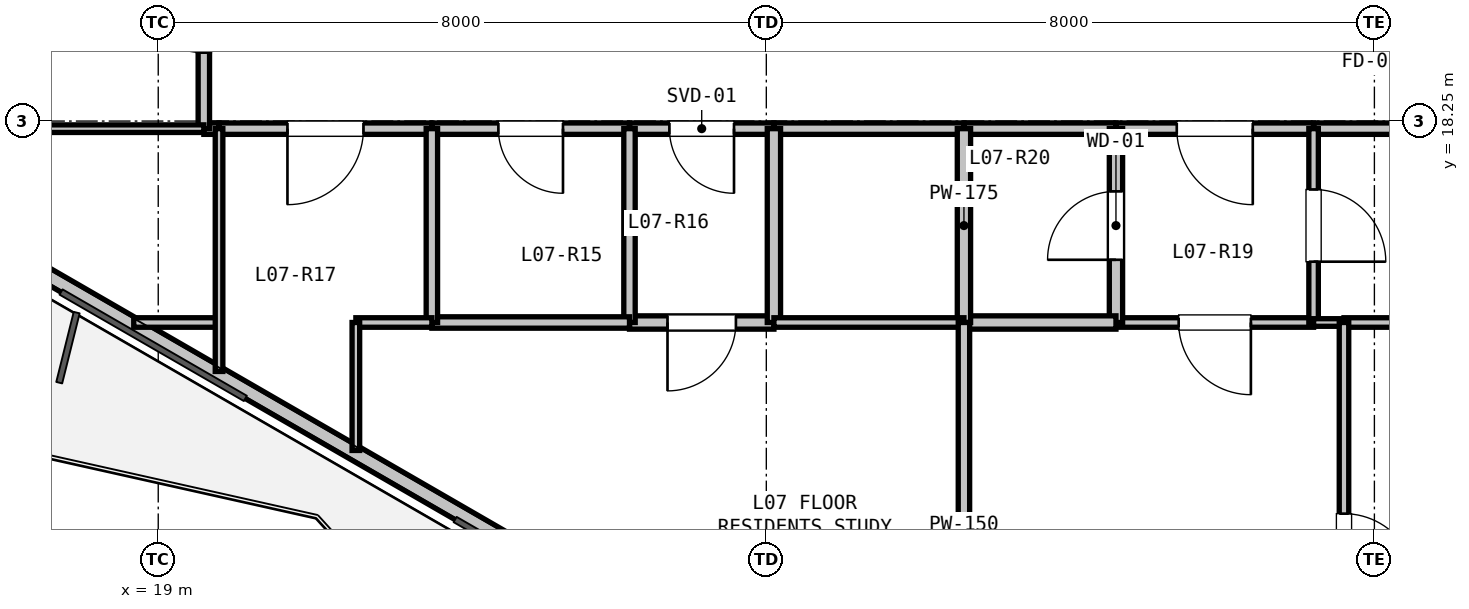
"""IFC4 building model, lengths in metres.
Left out: names, types, materials, properties, quantities, classifications, styles, units other than length and angle.
Written with IfcOpenShell. Run it as: python <this file> out.ifc"""

import sys

from ifc_helpers import new_model, si_unit, direction, frame, frame_2d, origin, place, context, subcontext, project, spatial, rectangle, extrude, element, fill, save


model = new_model("IFC4")
c1 = context("Model", 3, precision=1e-05, world=origin(), true_north=direction((0.0, 1.0)))
c2 = subcontext(c1, "Body", "Model", "MODEL_VIEW")
j1 = project(units=[si_unit("LENGTHUNIT", "METRE"), si_unit("PLANEANGLEUNIT", "RADIAN")], contexts=[c1])
p1 = place(None, origin())
s1 = spatial("IfcSite", under=j1, at=p1, CompositionType="ELEMENT")
p2 = place(p1, origin())
s2 = spatial("IfcBuilding", under=s1, at=p2, CompositionType="ELEMENT")
p3 = place(p2, frame((0.0, 0.0, 29.1)))
s3 = spatial("IfcBuildingStorey", under=s2, at=p3, CompositionType="ELEMENT", Elevation=29.1)
p4 = place(p3, frame((26.76, 10.896, 0.0), z_axis=(0.0, 0.0, 1.0), x_axis=(-0.866027351828, 0.499996625875, 0.0)))
e1 = element("IfcWall", 1, at=p4, inside=s3, PredefinedType="PARAPET", context=c2, shape_type="SweptSolid", body=[
    extrude(rectangle(XDim=11.973, YDim=0.2, at=frame_2d((5.987, 0.0))), origin(), (0.0, 0.0, 1.0), 0.2),
])
p5 = place(p3, frame((35.8, 18.15, 0.0), z_axis=(0.0, 0.0, 1.0), x_axis=(-1.0, 0.0, 0.0)))
e2 = element("IfcWall", 2, at=p5, inside=s3, PredefinedType="PARTITIONING", context=c2, shape_type="SweptSolid", body=[
    extrude(rectangle(XDim=1.6, YDim=0.15, at=frame_2d((0.8, 0.0))), origin(), (0.0, 0.0, 1.0), 3.04),
])
p6 = place(p3, frame((34.2, 18.15, 0.0), z_axis=(0.0, 0.0, 1.0), x_axis=(-1.0, 0.0, 0.0)))
e3 = element("IfcWall", 3, at=p6, inside=s3, PredefinedType="PARTITIONING", context=c2, shape_type="SweptSolid", body=[
    extrude(rectangle(XDim=2.6, YDim=0.15, at=frame_2d((1.3, 0.0))), origin(), (0.0, 0.0, 1.0), 3.04),
])
p7 = place(p6, frame((0.8, 0.0, 0.0)))
e4 = element("IfcOpeningElement", 4, at=p7, cuts=e3, PredefinedType="OPENING", context=c2, shape_type="SweptSolid", body=[
    extrude(rectangle(XDim=1.0, YDim=2.15, at=frame_2d((0.5, 1.075))), frame((0.0, 0.085, 0.0), z_axis=(0.0, -1.0, 0.0), x_axis=(1.0, 0.0, 0.0)), (0.0, 0.0, 1.0), 0.17),
])
p8 = place(p3, frame((31.6, 18.15, 0.0), z_axis=(0.0, 0.0, 1.0), x_axis=(-1.0, 0.0, 0.0)))
e5 = element("IfcWall", 5, at=p8, inside=s3, PredefinedType="PARTITIONING", context=c2, shape_type="SweptSolid", body=[
    extrude(rectangle(XDim=2.0, YDim=0.15, at=frame_2d((1.0, 0.0))), origin(), (0.0, 0.0, 1.0), 3.04),
])
p9 = place(p3, frame((29.6, 18.15, 0.0), z_axis=(0.0, 0.0, 1.0), x_axis=(-1.0, 0.0, 0.0)))
e6 = element("IfcWall", 6, at=p9, inside=s3, PredefinedType="PARTITIONING", context=c2, shape_type="SweptSolid", body=[
    extrude(rectangle(XDim=2.5, YDim=0.15, at=frame_2d((1.25, 0.0))), origin(), (0.0, 0.0, 1.0), 3.04),
])
p10 = place(p3, frame((27.1, 18.15, 0.0), z_axis=(0.0, 0.0, 1.0), x_axis=(-1.0, 0.0, 0.0)))
e7 = element("IfcWall", 7, at=p10, inside=s3, PredefinedType="PARTITIONING", context=c2, shape_type="SweptSolid", body=[
    extrude(rectangle(XDim=1.9, YDim=0.15, at=frame_2d((0.95, 0.0))), origin(), (0.0, 0.0, 1.0), 3.04),
])
p11 = place(p10, frame((0.525, 0.0, 0.0)))
e8 = element("IfcOpeningElement", 8, at=p11, cuts=e7, PredefinedType="OPENING", context=c2, shape_type="SweptSolid", body=[
    extrude(rectangle(XDim=0.85, YDim=2.1, at=frame_2d((0.425, 1.05))), frame((0.0, 0.085, 0.0), z_axis=(0.0, -1.0, 0.0), x_axis=(1.0, 0.0, 0.0)), (0.0, 0.0, 1.0), 0.17),
])
p12 = place(p3, frame((25.2, 18.15, 0.0), z_axis=(0.0, 0.0, 1.0), x_axis=(-1.0, 0.0, 0.0)))
e9 = element("IfcWall", 9, at=p12, inside=s3, PredefinedType="PARTITIONING", context=c2, shape_type="SweptSolid", body=[
    extrude(rectangle(XDim=2.6, YDim=0.15, at=frame_2d((1.3, 0.0))), origin(), (0.0, 0.0, 1.0), 2.337),
])
p13 = place(p12, frame((0.875, 0.0, 0.0)))
e10 = element("IfcOpeningElement", 10, at=p13, cuts=e9, PredefinedType="OPENING", context=c2, shape_type="SweptSolid", body=[
    extrude(rectangle(XDim=0.85, YDim=2.1, at=frame_2d((0.425, 1.05))), frame((0.0, 0.085, 0.0), z_axis=(0.0, -1.0, 0.0), x_axis=(1.0, 0.0, 0.0)), (0.0, 0.0, 1.0), 0.17),
])
p14 = place(p3, frame((22.6, 18.15, 0.0), z_axis=(0.0, 0.0, 1.0), x_axis=(-1.0, 0.0, 0.0)))
e11 = element("IfcWall", 11, at=p14, inside=s3, PredefinedType="PARTITIONING", context=c2, shape_type="SweptSolid", body=[
    extrude(rectangle(XDim=2.8, YDim=0.15, at=frame_2d((1.4, 0.0))), origin(), (0.0, 0.0, 1.0), 3.04),
])
p15 = place(p14, frame((0.9, 0.0, 0.0)))
e12 = element("IfcOpeningElement", 12, at=p15, cuts=e11, PredefinedType="OPENING", context=c2, shape_type="SweptSolid", body=[
    extrude(rectangle(XDim=1.0, YDim=2.15, at=frame_2d((0.5, 1.075))), frame((0.0, 0.085, 0.0), z_axis=(0.0, -1.0, 0.0), x_axis=(1.0, 0.0, 0.0)), (0.0, 0.0, 1.0), 0.17),
])
p16 = place(p3, frame((19.8, 18.15, 0.0), z_axis=(0.0, 0.0, 1.0), x_axis=(-1.0, 0.0, 0.0)))
e13 = element("IfcWall", 13, at=p16, inside=s3, PredefinedType="PARTITIONING", context=c2, shape_type="SweptSolid", body=[
    extrude(rectangle(XDim=0.2, YDim=0.15, at=frame_2d((0.1, 0.0))), origin(), (0.0, 0.0, 1.0), 3.04),
])
p17 = place(p3, frame((19.6, 18.15, 0.0), z_axis=(0.0, 0.0, 1.0), x_axis=(0.0, 1.0, 0.0)))
e14 = element("IfcWall", 14, at=p17, inside=s3, PredefinedType="PARTITIONING", context=c2, shape_type="SweptSolid", body=[
    extrude(rectangle(XDim=3.0, YDim=0.15, at=frame_2d((1.5, 0.0))), origin(), (0.0, 0.0, 1.0), 2.337),
])
p18 = place(p17, frame((1.0, 0.0, 0.0)))
e15 = element("IfcOpeningElement", 15, at=p18, cuts=e14, PredefinedType="OPENING", context=c2, shape_type="SweptSolid", body=[
    extrude(rectangle(XDim=1.0, YDim=2.15, at=frame_2d((0.5, 1.075))), frame((0.0, 0.085, 0.0), z_axis=(0.0, -1.0, 0.0), x_axis=(1.0, 0.0, 0.0)), (0.0, 0.0, 1.0), 0.17),
])
p19 = place(p3, frame((34.2, 15.6, 0.0), z_axis=(0.0, 0.0, 1.0), x_axis=(-1.0, 0.0, 0.0)))
e16 = element("IfcWall", 16, at=p19, inside=s3, PredefinedType="PARTITIONING", context=c2, shape_type="SweptSolid", body=[
    extrude(rectangle(XDim=2.6, YDim=0.125, at=frame_2d((1.3, 0.0))), origin(), (0.0, 0.0, 1.0), 3.04),
])
p20 = place(p19, frame((0.825, 0.0, 0.0)))
e17 = element("IfcOpeningElement", 17, at=p20, cuts=e16, PredefinedType="OPENING", context=c2, shape_type="SweptSolid", body=[
    extrude(rectangle(XDim=0.95, YDim=2.1, at=frame_2d((0.475, 1.05))), frame((0.0, 0.073, 0.0), z_axis=(0.0, -1.0, 0.0), x_axis=(1.0, 0.0, 0.0)), (0.0, 0.0, 1.0), 0.145),
])
p21 = place(p3, frame((31.6, 15.6, 0.0), z_axis=(0.0, 0.0, 1.0), x_axis=(0.0, 1.0, 0.0)))
e18 = element("IfcWall", 18, at=p21, inside=s3, PredefinedType="PLUMBINGWALL", context=c2, shape_type="SweptSolid", body=[
    extrude(rectangle(XDim=2.55, YDim=0.175, at=frame_2d((1.275, 0.0))), origin(), (0.0, 0.0, 1.0), 3.04),
])
p22 = place(p21, frame((0.825, 0.0, 0.0)))
e19 = element("IfcOpeningElement", 19, at=p22, cuts=e18, PredefinedType="OPENING", context=c2, shape_type="SweptSolid", body=[
    extrude(rectangle(XDim=0.9, YDim=2.1, at=frame_2d((0.45, 1.05))), frame((0.0, 0.097, 0.0), z_axis=(0.0, -1.0, 0.0), x_axis=(1.0, 0.0, 0.0)), (0.0, 0.0, 1.0), 0.195),
])
p23 = place(p3, frame((34.2, 18.15, 0.0), z_axis=(0.0, 0.0, 1.0), x_axis=(0.0, -1.0, 0.0)))
e20 = element("IfcWall", 20, at=p23, inside=s3, PredefinedType="PARTITIONING", context=c2, shape_type="SweptSolid", body=[
    extrude(rectangle(XDim=2.55, YDim=0.125, at=frame_2d((1.275, 0.0))), origin(), (0.0, 0.0, 1.0), 3.04),
])
p24 = place(p23, frame((0.8, 0.0, 0.0)))
e21 = element("IfcOpeningElement", 21, at=p24, cuts=e20, PredefinedType="OPENING", context=c2, shape_type="SweptSolid", body=[
    extrude(rectangle(XDim=0.95, YDim=2.1, at=frame_2d((0.475, 1.05))), frame((0.0, 0.073, 0.0), z_axis=(0.0, -1.0, 0.0), x_axis=(1.0, 0.0, 0.0)), (0.0, 0.0, 1.0), 0.145),
])
p25 = place(p3, frame((27.1, 15.6, 0.0), z_axis=(0.0, 0.0, 1.0), x_axis=(-1.0, 0.0, 0.0)))
e22 = element("IfcWall", 22, at=p25, inside=s3, PredefinedType="PLUMBINGWALL", context=c2, shape_type="SweptSolid", body=[
    extrude(rectangle(XDim=1.9, YDim=0.175, at=frame_2d((0.95, 0.0))), origin(), (0.0, 0.0, 1.0), 2.337),
])
p26 = place(p25, frame((0.5, 0.0, 0.0)))
e23 = element("IfcOpeningElement", 23, at=p26, cuts=e22, PredefinedType="OPENING", context=c2, shape_type="SweptSolid", body=[
    extrude(rectangle(XDim=0.9, YDim=2.1, at=frame_2d((0.45, 1.05))), frame((0.0, 0.097, 0.0), z_axis=(0.0, -1.0, 0.0), x_axis=(1.0, 0.0, 0.0)), (0.0, 0.0, 1.0), 0.195),
])
p27 = place(p3, frame((25.2, 15.6, 0.0), z_axis=(0.0, 0.0, 1.0), x_axis=(0.0, 1.0, 0.0)))
e24 = element("IfcWall", 24, at=p27, inside=s3, PredefinedType="PARTITIONING", context=c2, shape_type="SweptSolid", body=[
    extrude(rectangle(XDim=2.55, YDim=0.15, at=frame_2d((1.275, 0.0))), origin(), (0.0, 0.0, 1.0), 2.337),
])
p28 = place(p3, frame((27.1, 18.15, 0.0), z_axis=(0.0, 0.0, 1.0), x_axis=(0.0, -1.0, 0.0)))
e25 = element("IfcWall", 25, at=p28, inside=s3, PredefinedType="PLUMBINGWALL", context=c2, shape_type="SweptSolid", body=[
    extrude(rectangle(XDim=2.55, YDim=0.175, at=frame_2d((1.275, 0.0))), origin(), (0.0, 0.0, 1.0), 3.04),
])
p29 = place(p3, frame((31.6, 15.6, 0.0), z_axis=(0.0, 0.0, 1.0), x_axis=(-1.0, 0.0, 0.0)))
e26 = element("IfcWall", 26, at=p29, inside=s3, PredefinedType="PLUMBINGWALL", context=c2, shape_type="SweptSolid", body=[
    extrude(rectangle(XDim=2.0, YDim=0.175, at=frame_2d((1.0, 0.0))), origin(), (0.0, 0.0, 1.0), 3.04),
])
p30 = place(p3, frame((29.6, 15.6, 0.0), z_axis=(0.0, 0.0, 1.0), x_axis=(0.0, 1.0, 0.0)))
e27 = element("IfcWall", 27, at=p30, inside=s3, PredefinedType="PLUMBINGWALL", context=c2, shape_type="SweptSolid", body=[
    extrude(rectangle(XDim=2.55, YDim=0.175, at=frame_2d((1.275, 0.0))), origin(), (0.0, 0.0, 1.0), 3.04),
])
p31 = place(p3, frame((43.688, 15.6, 0.0), z_axis=(0.0, 0.0, 1.0), x_axis=(-1.0, 0.0, 0.0)))
e28 = element("IfcWall", 28, at=p31, inside=s3, PredefinedType="PARTITIONING", context=c2, shape_type="SweptSolid", body=[
    extrude(rectangle(XDim=9.088, YDim=0.125, at=frame_2d((4.544, 0.0))), origin(), (0.0, 0.0, 1.0), 2.337),
])
p32 = place(p31, frame((4.069, 0.0, 0.0)))
e29 = element("IfcOpeningElement", 29, at=p32, cuts=e28, PredefinedType="OPENING", context=c2, shape_type="SweptSolid", body=[
    extrude(rectangle(XDim=0.95, YDim=2.1, at=frame_2d((0.475, 1.05))), frame((0.0, 0.073, 0.0), z_axis=(0.0, -1.0, 0.0), x_axis=(1.0, 0.0, 0.0)), (0.0, 0.0, 1.0), 0.145),
])
p33 = place(p3, frame((34.6, 15.6, 0.0), z_axis=(0.0, 0.0, 1.0), x_axis=(-1.0, 0.0, 0.0)))
e30 = element("IfcWall", 30, at=p33, inside=s3, PredefinedType="PARTITIONING", context=c2, shape_type="SweptSolid", body=[
    extrude(rectangle(XDim=0.4, YDim=0.1, at=frame_2d((0.2, 0.0))), origin(), (0.0, 0.0, 1.0), 3.04),
])
p34 = place(p3, frame((19.6, 18.15, 0.0), z_axis=(0.0, 0.0, 1.0), x_axis=(-1.0, 0.0, 0.0)))
e31 = element("IfcWall", 31, at=p34, inside=s3, PredefinedType="PARTITIONING", context=c2, shape_type="SweptSolid", body=[
    extrude(rectangle(XDim=2.45, YDim=0.1, at=frame_2d((1.225, 0.0))), origin(), (0.0, 0.0, 1.0), 3.04),
])
p35 = place(p3, frame((25.2, 15.6, 0.0), z_axis=(0.0, 0.0, 1.0), x_axis=(-1.0, 0.0, 0.0)))
e32 = element("IfcWall", 32, at=p35, inside=s3, PredefinedType="PARTITIONING", context=c2, shape_type="SweptSolid", body=[
    extrude(rectangle(XDim=2.6, YDim=0.15, at=frame_2d((1.3, 0.0))), origin(), (0.0, 0.0, 1.0), 3.04),
])
p36 = place(p3, frame((22.6, 15.6, 0.0), z_axis=(0.0, 0.0, 1.0), x_axis=(0.0, 1.0, 0.0)))
e33 = element("IfcWall", 33, at=p36, inside=s3, PredefinedType="PARTITIONING", context=c2, shape_type="SweptSolid", body=[
    extrude(rectangle(XDim=2.55, YDim=0.15, at=frame_2d((1.275, 0.0))), origin(), (0.0, 0.0, 1.0), 3.04),
])
p37 = place(p3, frame((22.6, 15.6, 0.0), z_axis=(0.0, 0.0, 1.0), x_axis=(-1.0, 0.0, 0.0)))
e34 = element("IfcWall", 34, at=p37, inside=s3, PredefinedType="PARTITIONING", context=c2, shape_type="SweptSolid", body=[
    extrude(rectangle(XDim=1.0, YDim=0.125, at=frame_2d((0.5, 0.0))), origin(), (0.0, 0.0, 1.0), 3.04),
])
p38 = place(p3, frame((21.6, 15.6, 0.0), z_axis=(0.0, 0.0, 1.0), x_axis=(0.0, -1.0, 0.0)))
e35 = element("IfcWall", 35, at=p38, inside=s3, PredefinedType="PARTITIONING", context=c2, shape_type="SweptSolid", body=[
    extrude(rectangle(XDim=1.684, YDim=0.1, at=frame_2d((0.842, 0.0))), origin(), (0.0, 0.0, 1.0), 2.365),
])
p39 = place(p3, frame((18.678, 15.6, 0.0), z_axis=(0.0, 0.0, 1.0), x_axis=(1.0, 0.0, 0.0)))
e36 = element("IfcWall", 36, at=p39, inside=s3, PredefinedType="PARTITIONING", context=c2, shape_type="SweptSolid", body=[
    extrude(rectangle(XDim=1.122, YDim=0.125, at=frame_2d((0.561, 0.0))), origin(), (0.0, 0.0, 1.0), 2.365),
])
p40 = place(p3, frame((19.8, 14.956, 0.0), z_axis=(0.0, 0.0, 1.0), x_axis=(0.0, 1.0, 0.0)))
e37 = element("IfcWall", 37, at=p40, inside=s3, PredefinedType="PARTITIONING", context=c2, shape_type="SweptSolid", body=[
    extrude(rectangle(XDim=3.194, YDim=0.1, at=frame_2d((1.597, 0.0))), origin(), (0.0, 0.0, 1.0), 2.365),
])
p41 = place(p3, frame((27.1, 15.6, 0.0), z_axis=(0.0, 0.0, 1.0), x_axis=(1.0, 0.0, 0.0)))
e38 = element("IfcWall", 38, at=p41, inside=s3, PredefinedType="PARTITIONING", context=c2, shape_type="SweptSolid", body=[
    extrude(rectangle(XDim=2.5, YDim=0.125, at=frame_2d((1.25, 0.0))), origin(), (0.0, 0.0, 1.0), 3.04),
])
p42 = place(p3, frame((29.6, 15.6, 0.0), z_axis=(0.0, 0.0, 1.0), x_axis=(0.0, -1.0, 0.0)))
e39 = element("IfcWall", 39, at=p42, inside=s3, PredefinedType="PARTITIONING", context=c2, shape_type="SweptSolid", body=[
    extrude(rectangle(XDim=6.157, YDim=0.15, at=frame_2d((3.079, 0.0))), origin(), (0.0, 0.0, 1.0), 2.337),
])
p43 = place(p3, frame((34.6, 15.6, 0.0), z_axis=(0.0, 0.0, 1.0), x_axis=(0.0, -1.0, 0.0)))
e40 = element("IfcWall", 40, at=p43, inside=s3, PredefinedType="PARTITIONING", context=c2, shape_type="SweptSolid", body=[
    extrude(rectangle(XDim=5.98, YDim=0.125, at=frame_2d((2.99, 0.0))), origin(), (0.0, 0.0, 1.0), 3.04),
])
p44 = place(p43, frame((2.515, 0.0, 0.0)))
e41 = element("IfcOpeningElement", 41, at=p44, cuts=e40, PredefinedType="OPENING", context=c2, shape_type="SweptSolid", body=[
    extrude(rectangle(XDim=0.95, YDim=2.1, at=frame_2d((0.475, 1.05))), frame((0.0, 0.073, 0.0), z_axis=(0.0, -1.0, 0.0), x_axis=(1.0, 0.0, 0.0)), (0.0, 0.0, 1.0), 0.145),
])
p45 = place(p7, origin())
e42 = element("IfcDoor", 42, at=p45, inside=s3, OperationType="SINGLE_SWING_LEFT", PredefinedType="DOOR", context=c2, shape_type="SweptSolid", body=[
    extrude(rectangle(XDim=1.0, YDim=2.15, at=frame_2d((0.5, 1.075))), frame((0.0, 0.025, 0.0), z_axis=(0.0, -1.0, 0.0), x_axis=(1.0, 0.0, 0.0)), (0.0, 0.0, 1.0), 0.05),
])
fill(e4, e42)
p46 = place(p11, origin())
e43 = element("IfcDoor", 43, at=p46, inside=s3, OperationType="SINGLE_SWING_LEFT", PredefinedType="DOOR", context=c2, shape_type="SweptSolid", body=[
    extrude(rectangle(XDim=0.85, YDim=2.1, at=frame_2d((0.425, 1.05))), frame((0.0, 0.025, 0.0), z_axis=(0.0, -1.0, 0.0), x_axis=(1.0, 0.0, 0.0)), (0.0, 0.0, 1.0), 0.05),
])
fill(e8, e43)
p47 = place(p13, origin())
e44 = element("IfcDoor", 44, at=p47, inside=s3, OperationType="SINGLE_SWING_LEFT", PredefinedType="DOOR", context=c2, shape_type="SweptSolid", body=[
    extrude(rectangle(XDim=0.85, YDim=2.1, at=frame_2d((0.425, 1.05))), frame((0.0, 0.025, 0.0), z_axis=(0.0, -1.0, 0.0), x_axis=(1.0, 0.0, 0.0)), (0.0, 0.0, 1.0), 0.05),
])
fill(e10, e44)
p48 = place(p15, origin())
e45 = element("IfcDoor", 45, at=p48, inside=s3, OperationType="SINGLE_SWING_RIGHT", PredefinedType="DOOR", context=c2, shape_type="SweptSolid", body=[
    extrude(rectangle(XDim=1.0, YDim=2.15, at=frame_2d((0.5, 1.075))), frame((0.0, 0.025, 0.0), z_axis=(0.0, -1.0, 0.0), x_axis=(1.0, 0.0, 0.0)), (0.0, 0.0, 1.0), 0.05),
])
fill(e12, e45)
p49 = place(p22, origin())
e46 = element("IfcDoor", 46, at=p49, inside=s3, OperationType="SINGLE_SWING_LEFT", PredefinedType="DOOR", context=c2, shape_type="SweptSolid", body=[
    extrude(rectangle(XDim=0.9, YDim=2.1, at=frame_2d((0.45, 1.05))), frame((0.0, 0.025, 0.0), z_axis=(0.0, -1.0, 0.0), x_axis=(1.0, 0.0, 0.0)), (0.0, 0.0, 1.0), 0.05),
])
fill(e19, e46)
p50 = place(p24, origin())
e47 = element("IfcDoor", 47, at=p50, inside=s3, OperationType="SINGLE_SWING_RIGHT", PredefinedType="DOOR", context=c2, shape_type="SweptSolid", body=[
    extrude(rectangle(XDim=0.95, YDim=2.1, at=frame_2d((0.475, 1.05))), frame((0.0, 0.025, 0.0), z_axis=(0.0, -1.0, 0.0), x_axis=(1.0, 0.0, 0.0)), (0.0, 0.0, 1.0), 0.05),
])
fill(e21, e47)
p51 = place(p20, origin())
e48 = element("IfcDoor", 48, at=p51, inside=s3, OperationType="SINGLE_SWING_LEFT", PredefinedType="DOOR", context=c2, shape_type="SweptSolid", body=[
    extrude(rectangle(XDim=0.95, YDim=2.1, at=frame_2d((0.475, 1.05))), frame((0.0, 0.025, 0.0), z_axis=(0.0, -1.0, 0.0), x_axis=(1.0, 0.0, 0.0)), (0.0, 0.0, 1.0), 0.05),
])
fill(e17, e48)
p52 = place(p44, origin())
e49 = element("IfcDoor", 49, at=p52, inside=s3, OperationType="SINGLE_SWING_RIGHT", PredefinedType="DOOR", context=c2, shape_type="SweptSolid", body=[
    extrude(rectangle(XDim=0.95, YDim=2.1, at=frame_2d((0.475, 1.05))), frame((0.0, 0.025, 0.0), z_axis=(0.0, -1.0, 0.0), x_axis=(1.0, 0.0, 0.0)), (0.0, 0.0, 1.0), 0.05),
])
fill(e41, e49)
p53 = place(p26, origin())
e50 = element("IfcDoor", 50, at=p53, inside=s3, OperationType="SINGLE_SWING_RIGHT", PredefinedType="DOOR", context=c2, shape_type="SweptSolid", body=[
    extrude(rectangle(XDim=0.9, YDim=2.1, at=frame_2d((0.45, 1.05))), frame((0.0, 0.025, 0.0), z_axis=(0.0, -1.0, 0.0), x_axis=(1.0, 0.0, 0.0)), (0.0, 0.0, 1.0), 0.05),
])
fill(e23, e50)
save(model, sys.argv[1])
